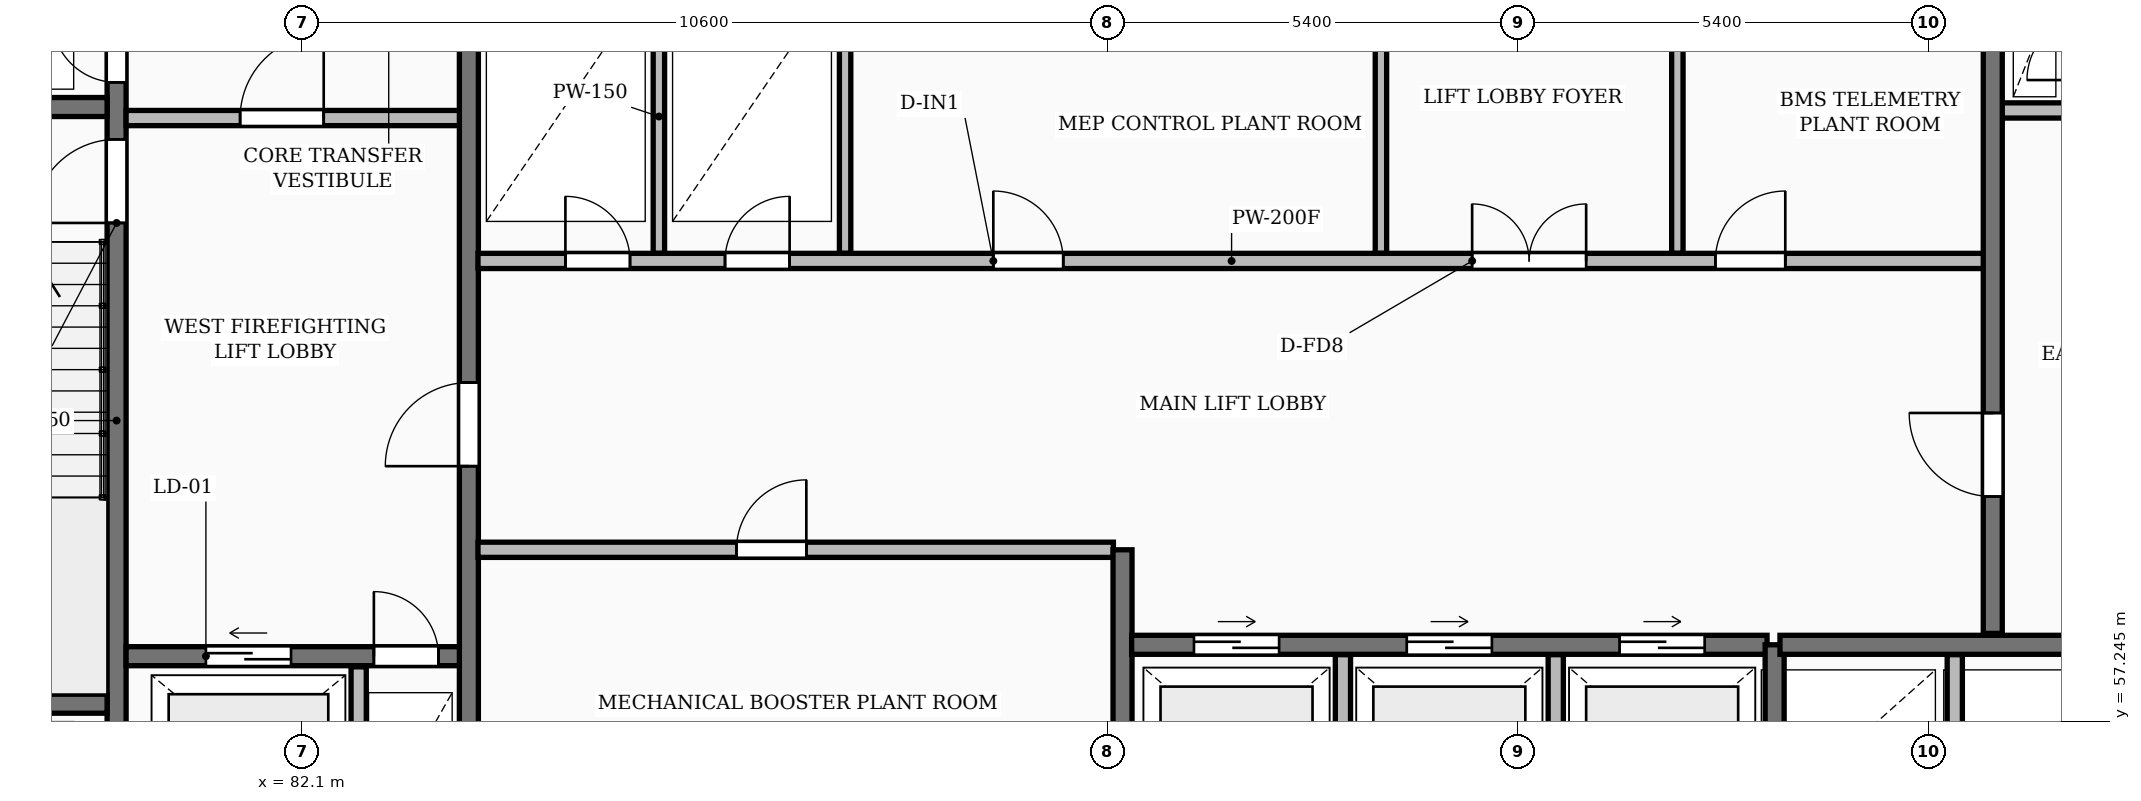
"""IFC4 building model, lengths in metres.
Left out: names, types, materials, properties, quantities, classifications, styles, units other than length and angle.
Written with IfcOpenShell. Run it as: python <this file> out.ifc"""

import sys

from ifc_helpers import new_model, si_unit, direction, frame, frame_2d, origin, place, context, subcontext, project, spatial, rectangle, extrude, element, fill, save


model = new_model("IFC4")
c1 = context("Model", 3, precision=1e-05, world=origin(), true_north=direction((0.0, 1.0)))
c2 = subcontext(c1, "Body", "Model", "MODEL_VIEW")
j1 = project(units=[si_unit("LENGTHUNIT", "METRE"), si_unit("PLANEANGLEUNIT", "RADIAN")], contexts=[c1])
p1 = place(None, origin())
s1 = spatial("IfcSite", under=j1, at=p1, CompositionType="ELEMENT")
p2 = place(p1, origin())
s2 = spatial("IfcBuilding", under=s1, at=p2, CompositionType="ELEMENT")
p3 = place(p2, frame((0.0, 0.0, 157.3)))
s3 = spatial("IfcBuildingStorey", under=s2, at=p3, CompositionType="ELEMENT", Elevation=157.3)
p4 = place(p3, frame((79.665, 55.4, 0.0), z_axis=(0.0, 0.0, 1.0), x_axis=(0.0, 1.0, 0.0)))
e1 = element("IfcWall", 1, at=p4, inside=s3, PredefinedType="SHEAR", context=c2, shape_type="SweptSolid", body=[
    extrude(rectangle(XDim=11.6, YDim=0.25, at=frame_2d((5.8, 0.0))), origin(), (0.0, 0.0, 1.0), 4.8),
])
p5 = place(p4, frame((0.55, 0.0, 0.0)))
e2 = element("IfcOpeningElement", 2, at=p5, cuts=e1, PredefinedType="OPENING", context=c2, shape_type="SweptSolid", body=[
    extrude(rectangle(XDim=0.85, YDim=2.05, at=frame_2d((0.425, 1.025))), frame((0.0, 0.135, 0.0), z_axis=(0.0, -1.0, 0.0), x_axis=(1.0, 0.0, 0.0)), (0.0, 0.0, 1.0), 0.27),
])
p6 = place(p4, frame((8.4, 0.0, 0.0)))
e3 = element("IfcOpeningElement", 3, at=p6, cuts=e1, PredefinedType="OPENING", context=c2, shape_type="SweptSolid", body=[
    extrude(rectangle(XDim=1.1, YDim=2.1, at=frame_2d((0.55, 1.05))), frame((0.0, 0.135, 0.0), z_axis=(0.0, -1.0, 0.0), x_axis=(1.0, 0.0, 0.0)), (0.0, 0.0, 1.0), 0.27),
])
p7 = place(p4, frame((10.25, 0.0, 0.0)))
e4 = element("IfcOpeningElement", 4, at=p7, cuts=e1, PredefinedType="OPENING", context=c2, shape_type="SweptSolid", body=[
    extrude(rectangle(XDim=0.85, YDim=2.05, at=frame_2d((0.425, 1.025))), frame((0.0, 0.135, 0.0), z_axis=(0.0, -1.0, 0.0), x_axis=(1.0, 0.0, 0.0)), (0.0, 0.0, 1.0), 0.27),
])
for number, where, z_axis, x_axis in (
    (5, (76.3, 57.475, 0.0), (0.0, 0.0, 1.0), (1.0, 0.0, 0.0)),
    (6, (76.3, 65.325, 0.0), (0.0, 0.0, 1.0), (1.0, 0.0, 0.0)),
):
    element("IfcWall", number, at=place(p3, frame(where, z_axis=z_axis, x_axis=x_axis)), inside=s3, PredefinedType="SHEAR", context=c2, shape_type="SweptSolid", body=[
        extrude(rectangle(XDim=3.24, YDim=0.25, at=frame_2d((1.62, 0.0))), origin(), (0.0, 0.0, 1.0), 4.8),
    ])
p8 = place(p3, frame((79.79, 58.1, 0.0), z_axis=(0.0, 0.0, 1.0), x_axis=(1.0, 0.0, 0.0)))
e7 = element("IfcWall", 7, at=p8, inside=s3, PredefinedType="SHEAR", context=c2, shape_type="SweptSolid", body=[
    extrude(rectangle(XDim=4.39, YDim=0.25, at=frame_2d((2.195, 0.0))), origin(), (0.0, 0.0, 1.0), 4.8),
])
p9 = place(p8, frame((1.05, 0.0, 0.0)))
e8 = element("IfcOpeningElement", 8, at=p9, cuts=e7, PredefinedType="OPENING", context=c2, shape_type="SweptSolid", body=[
    extrude(rectangle(XDim=1.12, YDim=2.12, at=frame_2d((0.56, 1.06))), frame((0.0, 0.135, 0.0), z_axis=(0.0, -1.0, 0.0), x_axis=(1.0, 0.0, 0.0)), (0.0, 0.0, 1.0), 0.27),
])
p10 = place(p8, frame((3.26, 0.0, 0.0)))
e9 = element("IfcOpeningElement", 9, at=p10, cuts=e7, PredefinedType="OPENING", context=c2, shape_type="SweptSolid", body=[
    extrude(rectangle(XDim=0.85, YDim=2.05, at=frame_2d((0.425, 1.025))), frame((0.0, 0.135, 0.0), z_axis=(0.0, -1.0, 0.0), x_axis=(1.0, 0.0, 0.0)), (0.0, 0.0, 1.0), 0.27),
])
p11 = place(p3, frame((82.85, 55.4, 0.0), z_axis=(0.0, 0.0, 1.0), x_axis=(0.0, 1.0, 0.0)))
e10 = element("IfcWall", 10, at=p11, inside=s3, PredefinedType="PARTITIONING", context=c2, shape_type="SweptSolid", body=[
    extrude(rectangle(XDim=2.56, YDim=0.2, at=frame_2d((1.28, 0.0))), origin(), (0.0, 0.0, 1.0), 4.48),
])
p12 = place(p3, frame((79.79, 65.18, 0.0), z_axis=(0.0, 0.0, 1.0), x_axis=(1.0, 0.0, 0.0)))
e11 = element("IfcWall", 11, at=p12, inside=s3, PredefinedType="PARTITIONING", context=c2, shape_type="SweptSolid", body=[
    extrude(rectangle(XDim=4.39, YDim=0.2, at=frame_2d((2.195, 0.0))), origin(), (0.0, 0.0, 1.0), 4.48),
])
p13 = place(p12, frame((1.5, 0.0, 0.0)))
e12 = element("IfcOpeningElement", 12, at=p13, cuts=e11, PredefinedType="OPENING", context=c2, shape_type="SweptSolid", body=[
    extrude(rectangle(XDim=1.1, YDim=2.1, at=frame_2d((0.55, 1.05))), frame((0.0, 0.11, 0.0), z_axis=(0.0, -1.0, 0.0), x_axis=(1.0, 0.0, 0.0)), (0.0, 0.0, 1.0), 0.22),
])
p14 = place(p3, frame((84.3, 55.4, 0.0), z_axis=(0.0, 0.0, 1.0), x_axis=(0.0, 1.0, 0.0)))
e13 = element("IfcWall", 13, at=p14, inside=s3, PredefinedType="SHEAR", context=c2, shape_type="SweptSolid", body=[
    extrude(rectangle(XDim=11.6, YDim=0.25, at=frame_2d((5.8, 0.0))), origin(), (0.0, 0.0, 1.0), 4.8),
])
p15 = place(p14, frame((5.2, 0.0, 0.0)))
e14 = element("IfcOpeningElement", 14, at=p15, cuts=e13, PredefinedType="OPENING", context=c2, shape_type="SweptSolid", body=[
    extrude(rectangle(XDim=1.1, YDim=2.1, at=frame_2d((0.55, 1.05))), frame((0.0, 0.135, 0.0), z_axis=(0.0, -1.0, 0.0), x_axis=(1.0, 0.0, 0.0)), (0.0, 0.0, 1.0), 0.27),
])
p16 = place(p3, frame((84.42, 59.5, 0.0), z_axis=(0.0, 0.0, 1.0), x_axis=(1.0, 0.0, 0.0)))
e15 = element("IfcWall", 15, at=p16, inside=s3, PredefinedType="PARTITIONING", context=c2, shape_type="SweptSolid", body=[
    extrude(rectangle(XDim=8.36, YDim=0.2, at=frame_2d((4.18, 0.0))), origin(), (0.0, 0.0, 1.0), 4.48),
])
p17 = place(p16, frame((3.4, 0.0, 0.0)))
e16 = element("IfcOpeningElement", 16, at=p17, cuts=e15, PredefinedType="OPENING", context=c2, shape_type="SweptSolid", body=[
    extrude(rectangle(XDim=0.92, YDim=2.08, at=frame_2d((0.46, 1.04))), frame((0.0, 0.11, 0.0), z_axis=(0.0, -1.0, 0.0), x_axis=(1.0, 0.0, 0.0)), (0.0, 0.0, 1.0), 0.22),
])
p18 = place(p3, frame((92.9, 55.4, 0.0), z_axis=(0.0, 0.0, 1.0), x_axis=(0.0, 1.0, 0.0)))
e17 = element("IfcWall", 17, at=p18, inside=s3, PredefinedType="SHEAR", context=c2, shape_type="SweptSolid", body=[
    extrude(rectangle(XDim=4.1, YDim=0.25, at=frame_2d((2.05, 0.0))), origin(), (0.0, 0.0, 1.0), 4.8),
])
for number, where, z_axis, x_axis in (
    (18, (95.8, 55.4, 0.0), (0.0, 0.0, 1.0), (0.0, 1.0, 0.0)),
    (19, (98.6, 55.4, 0.0), (0.0, 0.0, 1.0), (0.0, 1.0, 0.0)),
):
    element("IfcWall", number, at=place(p3, frame(where, z_axis=z_axis, x_axis=x_axis)), inside=s3, PredefinedType="PARTITIONING", context=c2, shape_type="SweptSolid", body=[
        extrude(rectangle(XDim=2.72, YDim=0.2, at=frame_2d((1.36, 0.0))), origin(), (0.0, 0.0, 1.0), 4.48),
    ])
p19 = place(p3, frame((93.02, 58.25, 0.0), z_axis=(0.0, 0.0, 1.0), x_axis=(1.0, 0.0, 0.0)))
e20 = element("IfcWall", 20, at=p19, inside=s3, PredefinedType="SHEAR", context=c2, shape_type="SweptSolid", body=[
    extrude(rectangle(XDim=8.36, YDim=0.25, at=frame_2d((4.18, 0.0))), origin(), (0.0, 0.0, 1.0), 4.8),
])
p20 = place(p19, frame((0.82, 0.0, 0.0)))
e21 = element("IfcOpeningElement", 21, at=p20, cuts=e20, PredefinedType="OPENING", context=c2, shape_type="SweptSolid", body=[
    extrude(rectangle(XDim=1.12, YDim=2.12, at=frame_2d((0.56, 1.06))), frame((0.0, 0.135, 0.0), z_axis=(0.0, -1.0, 0.0), x_axis=(1.0, 0.0, 0.0)), (0.0, 0.0, 1.0), 0.27),
])
p21 = place(p19, frame((3.62, 0.0, 0.0)))
e22 = element("IfcOpeningElement", 22, at=p21, cuts=e20, PredefinedType="OPENING", context=c2, shape_type="SweptSolid", body=[
    extrude(rectangle(XDim=1.12, YDim=2.12, at=frame_2d((0.56, 1.06))), frame((0.0, 0.135, 0.0), z_axis=(0.0, -1.0, 0.0), x_axis=(1.0, 0.0, 0.0)), (0.0, 0.0, 1.0), 0.27),
])
p22 = place(p19, frame((6.42, 0.0, 0.0)))
e23 = element("IfcOpeningElement", 23, at=p22, cuts=e20, PredefinedType="OPENING", context=c2, shape_type="SweptSolid", body=[
    extrude(rectangle(XDim=1.12, YDim=2.12, at=frame_2d((0.56, 1.06))), frame((0.0, 0.135, 0.0), z_axis=(0.0, -1.0, 0.0), x_axis=(1.0, 0.0, 0.0)), (0.0, 0.0, 1.0), 0.27),
])
p23 = place(p3, frame((101.48, 55.4, 0.0), z_axis=(0.0, 0.0, 1.0), x_axis=(0.0, 1.0, 0.0)))
e24 = element("IfcWall", 24, at=p23, inside=s3, PredefinedType="SHEAR", context=c2, shape_type="SweptSolid", body=[
    extrude(rectangle(XDim=2.85, YDim=0.25, at=frame_2d((1.425, 0.0))), origin(), (0.0, 0.0, 1.0), 4.8),
])
p24 = place(p3, frame((103.85, 55.4, 0.0), z_axis=(0.0, 0.0, 1.0), x_axis=(0.0, 1.0, 0.0)))
e25 = element("IfcWall", 25, at=p24, inside=s3, PredefinedType="PARTITIONING", context=c2, shape_type="SweptSolid", body=[
    extrude(rectangle(XDim=2.72, YDim=0.2, at=frame_2d((1.36, 0.0))), origin(), (0.0, 0.0, 1.0), 4.48),
])
p25 = place(p3, frame((101.55, 58.25, 0.0), z_axis=(0.0, 0.0, 1.0), x_axis=(1.0, 0.0, 0.0)))
e26 = element("IfcWall", 26, at=p25, inside=s3, PredefinedType="SHEAR", context=c2, shape_type="SweptSolid", body=[
    extrude(rectangle(XDim=4.6, YDim=0.25, at=frame_2d((2.3, 0.0))), origin(), (0.0, 0.0, 1.0), 4.8),
])
for number, where, z_axis, x_axis in (
    (27, (86.8, 63.4, 0.0), (0.0, 0.0, 1.0), (0.0, 1.0, 0.0)),
    (28, (89.25, 63.4, 0.0), (0.0, 0.0, 1.0), (0.0, 1.0, 0.0)),
    (29, (96.3, 63.4, 0.0), (0.0, 0.0, 1.0), (0.0, 1.0, 0.0)),
    (30, (100.2, 63.4, 0.0), (0.0, 0.0, 1.0), (0.0, 1.0, 0.0)),
):
    element("IfcWall", number, at=place(p3, frame(where, z_axis=z_axis, x_axis=x_axis)), inside=s3, PredefinedType="PARTITIONING", context=c2, shape_type="SweptSolid", body=[
        extrude(rectangle(XDim=3.6, YDim=0.15, at=frame_2d((1.8, 0.0))), origin(), (0.0, 0.0, 1.0), 4.48),
    ])
p26 = place(p3, frame((84.42, 63.3, 0.0), z_axis=(0.0, 0.0, 1.0), x_axis=(1.0, 0.0, 0.0)))
e31 = element("IfcWall", 31, at=p26, inside=s3, PredefinedType="PARTITIONING", context=c2, shape_type="SweptSolid", body=[
    extrude(rectangle(XDim=19.83, YDim=0.2, at=frame_2d((9.915, 0.0))), origin(), (0.0, 0.0, 1.0), 4.48),
])
p27 = place(p26, frame((1.15, 0.0, 0.0)))
e32 = element("IfcOpeningElement", 32, at=p27, cuts=e31, PredefinedType="OPENING", context=c2, shape_type="SweptSolid", body=[
    extrude(rectangle(XDim=0.85, YDim=2.05, at=frame_2d((0.425, 1.025))), frame((0.0, 0.11, 0.0), z_axis=(0.0, -1.0, 0.0), x_axis=(1.0, 0.0, 0.0)), (0.0, 0.0, 1.0), 0.22),
])
p28 = place(p26, frame((3.25, 0.0, 0.0)))
e33 = element("IfcOpeningElement", 33, at=p28, cuts=e31, PredefinedType="OPENING", context=c2, shape_type="SweptSolid", body=[
    extrude(rectangle(XDim=0.85, YDim=2.05, at=frame_2d((0.425, 1.025))), frame((0.0, 0.11, 0.0), z_axis=(0.0, -1.0, 0.0), x_axis=(1.0, 0.0, 0.0)), (0.0, 0.0, 1.0), 0.22),
])
p29 = place(p26, frame((13.08, 0.0, 0.0)))
e34 = element("IfcOpeningElement", 34, at=p29, cuts=e31, PredefinedType="OPENING", context=c2, shape_type="SweptSolid", body=[
    extrude(rectangle(XDim=1.5, YDim=2.2, at=frame_2d((0.75, 1.1))), frame((0.0, 0.11, 0.0), z_axis=(0.0, -1.0, 0.0), x_axis=(1.0, 0.0, 0.0)), (0.0, 0.0, 1.0), 0.22),
])
p30 = place(p26, frame((6.78, 0.0, 0.0)))
e35 = element("IfcOpeningElement", 35, at=p30, cuts=e31, PredefinedType="OPENING", context=c2, shape_type="SweptSolid", body=[
    extrude(rectangle(XDim=0.92, YDim=2.08, at=frame_2d((0.46, 1.04))), frame((0.0, 0.11, 0.0), z_axis=(0.0, -1.0, 0.0), x_axis=(1.0, 0.0, 0.0)), (0.0, 0.0, 1.0), 0.22),
])
p31 = place(p26, frame((16.28, 0.0, 0.0)))
e36 = element("IfcOpeningElement", 36, at=p31, cuts=e31, PredefinedType="OPENING", context=c2, shape_type="SweptSolid", body=[
    extrude(rectangle(XDim=0.92, YDim=2.08, at=frame_2d((0.46, 1.04))), frame((0.0, 0.11, 0.0), z_axis=(0.0, -1.0, 0.0), x_axis=(1.0, 0.0, 0.0)), (0.0, 0.0, 1.0), 0.22),
])
p32 = place(p3, frame((104.45, 65.28, 0.0), z_axis=(0.0, 0.0, 1.0), x_axis=(1.0, 0.0, 0.0)))
e37 = element("IfcWall", 37, at=p32, inside=s3, PredefinedType="PARTITIONING", context=c2, shape_type="SweptSolid", body=[
    extrude(rectangle(XDim=1.2, YDim=0.2, at=frame_2d((0.6, 0.0))), origin(), (0.0, 0.0, 1.0), 4.48),
])
p33 = place(p3, frame((104.35, 58.4, 0.0), z_axis=(0.0, 0.0, 1.0), x_axis=(0.0, 1.0, 0.0)))
e38 = element("IfcWall", 38, at=p33, inside=s3, PredefinedType="SHEAR", context=c2, shape_type="SweptSolid", body=[
    extrude(rectangle(XDim=8.6, YDim=0.25, at=frame_2d((4.3, 0.0))), origin(), (0.0, 0.0, 1.0), 4.8),
])
p34 = place(p33, frame((1.8, 0.0, 0.0)))
e39 = element("IfcOpeningElement", 39, at=p34, cuts=e38, PredefinedType="OPENING", context=c2, shape_type="SweptSolid", body=[
    extrude(rectangle(XDim=1.1, YDim=2.1, at=frame_2d((0.55, 1.05))), frame((0.0, 0.135, 0.0), z_axis=(0.0, -1.0, 0.0), x_axis=(1.0, 0.0, 0.0)), (0.0, 0.0, 1.0), 0.27),
])
p35 = place(p6, origin())
e40 = element("IfcDoor", 40, at=p35, inside=s3, OperationType="SINGLE_SWING_LEFT", PredefinedType="DOOR", context=c2, shape_type="SweptSolid", body=[
    extrude(rectangle(XDim=1.1, YDim=2.1, at=frame_2d((0.55, 1.05))), frame((0.0, 0.025, 0.0), z_axis=(0.0, -1.0, 0.0), x_axis=(1.0, 0.0, 0.0)), (0.0, 0.0, 1.0), 0.05),
])
fill(e3, e40)
p36 = place(p7, origin())
e41 = element("IfcDoor", 41, at=p36, inside=s3, OperationType="SINGLE_SWING_RIGHT", PredefinedType="DOOR", context=c2, shape_type="SweptSolid", body=[
    extrude(rectangle(XDim=0.85, YDim=2.05, at=frame_2d((0.425, 1.025))), frame((0.0, 0.025, 0.0), z_axis=(0.0, -1.0, 0.0), x_axis=(1.0, 0.0, 0.0)), (0.0, 0.0, 1.0), 0.05),
])
fill(e4, e41)
p37 = place(p9, origin())
e42 = element("IfcDoor", 42, at=p37, inside=s3, OperationType="SLIDING_TO_LEFT", PredefinedType="DOOR", context=c2, shape_type="SweptSolid", body=[
    extrude(rectangle(XDim=1.12, YDim=2.12, at=frame_2d((0.56, 1.06))), frame((0.0, 0.025, 0.0), z_axis=(0.0, -1.0, 0.0), x_axis=(1.0, 0.0, 0.0)), (0.0, 0.0, 1.0), 0.05),
])
fill(e8, e42)
p38 = place(p10, origin())
e43 = element("IfcDoor", 43, at=p38, inside=s3, OperationType="SINGLE_SWING_LEFT", PredefinedType="DOOR", context=c2, shape_type="SweptSolid", body=[
    extrude(rectangle(XDim=0.85, YDim=2.05, at=frame_2d((0.425, 1.025))), frame((0.0, 0.025, 0.0), z_axis=(0.0, -1.0, 0.0), x_axis=(1.0, 0.0, 0.0)), (0.0, 0.0, 1.0), 0.05),
])
fill(e9, e43)
p39 = place(p13, origin())
e44 = element("IfcDoor", 44, at=p39, inside=s3, OperationType="SINGLE_SWING_RIGHT", PredefinedType="DOOR", context=c2, shape_type="SweptSolid", body=[
    extrude(rectangle(XDim=1.1, YDim=2.1, at=frame_2d((0.55, 1.05))), frame((0.0, 0.025, 0.0), z_axis=(0.0, -1.0, 0.0), x_axis=(1.0, 0.0, 0.0)), (0.0, 0.0, 1.0), 0.05),
])
fill(e12, e44)
p40 = place(p15, origin())
e45 = element("IfcDoor", 45, at=p40, inside=s3, OperationType="SINGLE_SWING_LEFT", PredefinedType="DOOR", context=c2, shape_type="SweptSolid", body=[
    extrude(rectangle(XDim=1.1, YDim=2.1, at=frame_2d((0.55, 1.05))), frame((0.0, 0.025, 0.0), z_axis=(0.0, -1.0, 0.0), x_axis=(1.0, 0.0, 0.0)), (0.0, 0.0, 1.0), 0.05),
])
fill(e14, e45)
p41 = place(p17, origin())
e46 = element("IfcDoor", 46, at=p41, inside=s3, OperationType="SINGLE_SWING_RIGHT", PredefinedType="DOOR", context=c2, shape_type="SweptSolid", body=[
    extrude(rectangle(XDim=0.92, YDim=2.08, at=frame_2d((0.46, 1.04))), frame((0.0, 0.025, 0.0), z_axis=(0.0, -1.0, 0.0), x_axis=(1.0, 0.0, 0.0)), (0.0, 0.0, 1.0), 0.05),
])
fill(e16, e46)
p42 = place(p20, origin())
e47 = element("IfcDoor", 47, at=p42, inside=s3, OperationType="SLIDING_TO_RIGHT", PredefinedType="DOOR", context=c2, shape_type="SweptSolid", body=[
    extrude(rectangle(XDim=1.12, YDim=2.12, at=frame_2d((0.56, 1.06))), frame((0.0, 0.025, 0.0), z_axis=(0.0, -1.0, 0.0), x_axis=(1.0, 0.0, 0.0)), (0.0, 0.0, 1.0), 0.05),
])
fill(e21, e47)
p43 = place(p21, origin())
e48 = element("IfcDoor", 48, at=p43, inside=s3, OperationType="SLIDING_TO_RIGHT", PredefinedType="DOOR", context=c2, shape_type="SweptSolid", body=[
    extrude(rectangle(XDim=1.12, YDim=2.12, at=frame_2d((0.56, 1.06))), frame((0.0, 0.025, 0.0), z_axis=(0.0, -1.0, 0.0), x_axis=(1.0, 0.0, 0.0)), (0.0, 0.0, 1.0), 0.05),
])
fill(e22, e48)
p44 = place(p22, origin())
e49 = element("IfcDoor", 49, at=p44, inside=s3, OperationType="SLIDING_TO_RIGHT", PredefinedType="DOOR", context=c2, shape_type="SweptSolid", body=[
    extrude(rectangle(XDim=1.12, YDim=2.12, at=frame_2d((0.56, 1.06))), frame((0.0, 0.025, 0.0), z_axis=(0.0, -1.0, 0.0), x_axis=(1.0, 0.0, 0.0)), (0.0, 0.0, 1.0), 0.05),
])
fill(e23, e49)
p45 = place(p27, origin())
e50 = element("IfcDoor", 50, at=p45, inside=s3, OperationType="SINGLE_SWING_LEFT", PredefinedType="DOOR", context=c2, shape_type="SweptSolid", body=[
    extrude(rectangle(XDim=0.85, YDim=2.05, at=frame_2d((0.425, 1.025))), frame((0.0, 0.025, 0.0), z_axis=(0.0, -1.0, 0.0), x_axis=(1.0, 0.0, 0.0)), (0.0, 0.0, 1.0), 0.05),
])
fill(e32, e50)
p46 = place(p28, origin())
e51 = element("IfcDoor", 51, at=p46, inside=s3, OperationType="SINGLE_SWING_RIGHT", PredefinedType="DOOR", context=c2, shape_type="SweptSolid", body=[
    extrude(rectangle(XDim=0.85, YDim=2.05, at=frame_2d((0.425, 1.025))), frame((0.0, 0.025, 0.0), z_axis=(0.0, -1.0, 0.0), x_axis=(1.0, 0.0, 0.0)), (0.0, 0.0, 1.0), 0.05),
])
fill(e33, e51)
p47 = place(p29, origin())
e52 = element("IfcDoor", 52, at=p47, inside=s3, OperationType="DOUBLE_DOOR_SINGLE_SWING", PredefinedType="DOOR", context=c2, shape_type="SweptSolid", body=[
    extrude(rectangle(XDim=1.5, YDim=2.2, at=frame_2d((0.75, 1.1))), frame((0.0, 0.025, 0.0), z_axis=(0.0, -1.0, 0.0), x_axis=(1.0, 0.0, 0.0)), (0.0, 0.0, 1.0), 0.05),
])
fill(e34, e52)
p48 = place(p30, origin())
e53 = element("IfcDoor", 53, at=p48, inside=s3, OperationType="SINGLE_SWING_LEFT", PredefinedType="DOOR", context=c2, shape_type="SweptSolid", body=[
    extrude(rectangle(XDim=0.92, YDim=2.08, at=frame_2d((0.46, 1.04))), frame((0.0, 0.025, 0.0), z_axis=(0.0, -1.0, 0.0), x_axis=(1.0, 0.0, 0.0)), (0.0, 0.0, 1.0), 0.05),
])
fill(e35, e53)
p49 = place(p31, origin())
e54 = element("IfcDoor", 54, at=p49, inside=s3, OperationType="SINGLE_SWING_RIGHT", PredefinedType="DOOR", context=c2, shape_type="SweptSolid", body=[
    extrude(rectangle(XDim=0.92, YDim=2.08, at=frame_2d((0.46, 1.04))), frame((0.0, 0.025, 0.0), z_axis=(0.0, -1.0, 0.0), x_axis=(1.0, 0.0, 0.0)), (0.0, 0.0, 1.0), 0.05),
])
fill(e36, e54)
p50 = place(p34, origin())
e55 = element("IfcDoor", 55, at=p50, inside=s3, OperationType="SINGLE_SWING_RIGHT", PredefinedType="DOOR", context=c2, shape_type="SweptSolid", body=[
    extrude(rectangle(XDim=1.1, YDim=2.1, at=frame_2d((0.55, 1.05))), frame((0.0, 0.025, 0.0), z_axis=(0.0, -1.0, 0.0), x_axis=(1.0, 0.0, 0.0)), (0.0, 0.0, 1.0), 0.05),
])
fill(e39, e55)
save(model, sys.argv[1])
